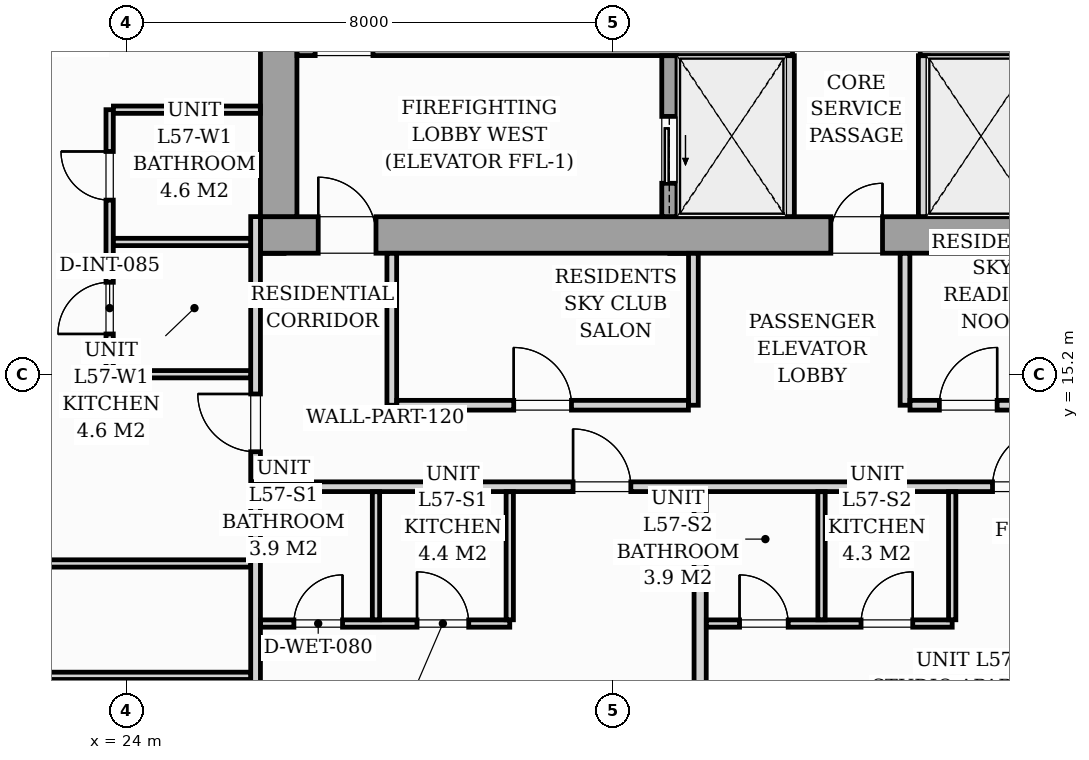
"""IFC4 building model, lengths in metres.
Left out: names, types, materials, properties, quantities, classifications, styles, units other than length and angle.
Written with IfcOpenShell. Run it as: python <this file> out.ifc"""

import sys

from ifc_helpers import new_model, si_unit, direction, frame, frame_2d, origin, origin_2d, place, context, subcontext, project, spatial, rectangle, i_section, extrude, source, transform, mapped, element, fill, save


model = new_model("IFC4")
c1 = context("Model", 3, precision=1e-05, world=origin(), true_north=direction((0.0, 1.0)))
c2 = subcontext(c1, "Body", "Model", "MODEL_VIEW")
j1 = project(units=[si_unit("LENGTHUNIT", "METRE"), si_unit("PLANEANGLEUNIT", "RADIAN")], contexts=[c1])
p1 = place(None, origin())
s1 = spatial("IfcSite", under=j1, at=p1, CompositionType="ELEMENT")
p2 = place(p1, origin())
s2 = spatial("IfcBuilding", under=s1, at=p2, CompositionType="ELEMENT")
p3 = place(p2, frame((0.0, 0.0, 198.6)))
s3 = spatial("IfcBuildingStorey", under=s2, at=p3, CompositionType="ELEMENT", Elevation=198.6)
m1 = source(origin(), c2, "Body", "SweptSolid", [
    extrude(i_section(OverallWidth=0.416, OverallDepth=0.446, WebThickness=0.039, FlangeThickness=0.063, FilletRadius=0.018, at=origin_2d()), origin(), (0.0, 0.0, 1.0), 3.196),
])
for number, where, z_axis, x_axis in (
    (1, (26.4, 17.4, 0.002), (0.0, 0.0, 1.0), (1.0, 0.0, 0.0)),
    (2, (33.12, 17.4, 0.002), (0.0, 0.0, 1.0), (1.0, 0.0, 0.0)),
):
    element("IfcColumn", number, at=place(p3, frame(where, z_axis=z_axis, x_axis=x_axis)), inside=s3, PredefinedType="PILASTER", context=c2, shape_type="MappedRepresentation", body=[
        mapped(m1, transform((0.0, 0.0, 0.0), scale=1.0)),
    ])
p4 = place(p3, frame((26.2, 17.5, 0.0), z_axis=(0.0, 0.0, 1.0), x_axis=(1.0, 0.0, 0.0)))
e3 = element("IfcWall", 3, at=p4, inside=s3, PredefinedType="SHEAR", context=c2, shape_type="SweptSolid", body=[
    extrude(rectangle(XDim=19.6, YDim=0.6, at=frame_2d((9.8, 0.0))), origin(), (0.0, 0.0, 1.0), 3.2),
])
p5 = place(p4, frame((0.95, 0.0, 0.0)))
e4 = element("IfcOpeningElement", 4, at=p5, cuts=e3, PredefinedType="OPENING", context=c2, shape_type="SweptSolid", body=[
    extrude(rectangle(XDim=0.95, YDim=2.06, at=frame_2d((0.475, 1.03))), frame((0.0, 0.31, 0.0), z_axis=(0.0, -1.0, 0.0), x_axis=(1.0, 0.0, 0.0)), (0.0, 0.0, 1.0), 0.62),
])
p6 = place(p4, frame((9.38, 0.0, 0.0)))
e5 = element("IfcOpeningElement", 5, at=p6, cuts=e3, PredefinedType="OPENING", context=c2, shape_type="SweptSolid", body=[
    extrude(rectangle(XDim=0.85, YDim=2.0, at=frame_2d((0.425, 1.0))), frame((0.0, 0.31, 0.0), z_axis=(0.0, -1.0, 0.0), x_axis=(1.0, 0.0, 0.0)), (0.0, 0.0, 1.0), 0.62),
])
p7 = place(p4, frame((17.55, 0.0, 0.0)))
e6 = element("IfcOpeningElement", 6, at=p7, cuts=e3, PredefinedType="OPENING", context=c2, shape_type="SweptSolid", body=[
    extrude(rectangle(XDim=0.95, YDim=2.06, at=frame_2d((0.475, 1.03))), frame((0.0, 0.31, 0.0), z_axis=(0.0, -1.0, 0.0), x_axis=(1.0, 0.0, 0.0)), (0.0, 0.0, 1.0), 0.62),
])
p8 = place(p3, frame((26.5, 17.802, 0.0), z_axis=(0.0, 0.0, 1.0), x_axis=(0.0, 1.0, 0.0)))
e7 = element("IfcWall", 7, at=p8, inside=s3, PredefinedType="SHEAR", context=c2, shape_type="SweptSolid", body=[
    extrude(rectangle(XDim=5.796, YDim=0.6, at=frame_2d((2.898, 0.0))), origin(), (0.0, 0.0, 1.0), 3.2),
])
p9 = place(p3, frame((26.802, 20.575, 0.0), z_axis=(0.0, 0.0, 1.0), x_axis=(1.0, 0.0, 0.0)))
e8 = element("IfcWall", 8, at=p9, inside=s3, PredefinedType="SOLIDWALL", context=c2, shape_type="SweptSolid", body=[
    extrude(rectangle(XDim=8.148, YDim=0.25, at=frame_2d((4.074, 0.0))), origin(), (0.0, 0.0, 1.0), 3.2),
])
p10 = place(p9, frame((0.298, 0.0, 0.0)))
e9 = element("IfcOpeningElement", 9, at=p10, cuts=e8, PredefinedType="OPENING", context=c2, shape_type="SweptSolid", body=[
    extrude(rectangle(XDim=0.95, YDim=2.06, at=frame_2d((0.475, 1.03))), frame((0.0, 0.135, 0.0), z_axis=(0.0, -1.0, 0.0), x_axis=(1.0, 0.0, 0.0)), (0.0, 0.0, 1.0), 0.27),
])
p11 = place(p3, frame((37.05, 20.575, 0.0), z_axis=(0.0, 0.0, 1.0), x_axis=(1.0, 0.0, 0.0)))
e10 = element("IfcWall", 10, at=p11, inside=s3, PredefinedType="SOLIDWALL", context=c2, shape_type="SweptSolid", body=[
    extrude(rectangle(XDim=8.148, YDim=0.25, at=frame_2d((4.074, 0.0))), origin(), (0.0, 0.0, 1.0), 3.2),
])
p12 = place(p11, frame((6.6, 0.0, 0.0)))
e11 = element("IfcOpeningElement", 11, at=p12, cuts=e10, PredefinedType="OPENING", context=c2, shape_type="SweptSolid", body=[
    extrude(rectangle(XDim=0.95, YDim=2.06, at=frame_2d((0.475, 1.03))), frame((0.0, 0.135, 0.0), z_axis=(0.0, -1.0, 0.0), x_axis=(1.0, 0.0, 0.0)), (0.0, 0.0, 1.0), 0.27),
])
p13 = place(p3, frame((32.925, 17.802, 0.0), z_axis=(0.0, 0.0, 1.0), x_axis=(0.0, 1.0, 0.0)))
e12 = element("IfcWall", 12, at=p13, inside=s3, PredefinedType="SOLIDWALL", context=c2, shape_type="SweptSolid", body=[
    extrude(rectangle(XDim=2.646, YDim=0.25, at=frame_2d((1.323, 0.0))), origin(), (0.0, 0.0, 1.0), 3.2),
])
p14 = place(p13, frame((0.548, 0.0, 0.0)))
e13 = element("IfcOpeningElement", 13, at=p14, cuts=e12, PredefinedType="OPENING", context=c2, shape_type="SweptSolid", body=[
    extrude(rectangle(XDim=1.1, YDim=2.08, at=frame_2d((0.55, 1.04))), frame((0.0, 0.135, 0.0), z_axis=(0.0, -1.0, 0.0), x_axis=(1.0, 0.0, 0.0)), (0.0, 0.0, 1.0), 0.27),
])
for number, where, z_axis, x_axis in (
    (14, (34.9, 17.802, 0.0), (0.0, 0.0, 1.0), (0.0, 1.0, 0.0)),
    (15, (37.1, 17.802, 0.0), (0.0, 0.0, 1.0), (0.0, 1.0, 0.0)),
):
    element("IfcWall", number, at=place(p3, frame(where, z_axis=z_axis, x_axis=x_axis)), inside=s3, PredefinedType="PARTITIONING", context=c2, shape_type="SweptSolid", body=[
        extrude(rectangle(XDim=2.646, YDim=0.16, at=frame_2d((1.323, 0.0))), origin(), (0.0, 0.0, 1.0), 2.94),
    ])
p15 = place(p3, frame((26.12, 13.36, 0.0), z_axis=(0.0, 0.0, 1.0), x_axis=(1.0, 0.0, 0.0)))
e16 = element("IfcWall", 16, at=p15, inside=s3, PredefinedType="PARTITIONING", context=c2, shape_type="SweptSolid", body=[
    extrude(rectangle(XDim=19.76, YDim=0.16, at=frame_2d((9.88, 0.0))), origin(), (0.0, 0.0, 1.0), 2.94),
])
p16 = place(p15, frame((5.221, 0.0, 0.0)))
e17 = element("IfcOpeningElement", 17, at=p16, cuts=e16, PredefinedType="OPENING", context=c2, shape_type="SweptSolid", body=[
    extrude(rectangle(XDim=0.95, YDim=2.06, at=frame_2d((0.475, 1.03))), frame((0.0, 0.09, 0.0), z_axis=(0.0, -1.0, 0.0), x_axis=(1.0, 0.0, 0.0)), (0.0, 0.0, 1.0), 0.18),
])
p17 = place(p15, frame((12.119, 0.0, 0.0)))
e18 = element("IfcOpeningElement", 18, at=p17, cuts=e16, PredefinedType="OPENING", context=c2, shape_type="SweptSolid", body=[
    extrude(rectangle(XDim=0.95, YDim=2.06, at=frame_2d((0.475, 1.03))), frame((0.0, 0.09, 0.0), z_axis=(0.0, -1.0, 0.0), x_axis=(1.0, 0.0, 0.0)), (0.0, 0.0, 1.0), 0.18),
])
p18 = place(p15, frame((14.492, 0.0, 0.0)))
e19 = element("IfcOpeningElement", 19, at=p18, cuts=e16, PredefinedType="OPENING", context=c2, shape_type="SweptSolid", body=[
    extrude(rectangle(XDim=0.95, YDim=2.06, at=frame_2d((0.475, 1.03))), frame((0.0, 0.09, 0.0), z_axis=(0.0, -1.0, 0.0), x_axis=(1.0, 0.0, 0.0)), (0.0, 0.0, 1.0), 0.18),
])
p19 = place(p3, frame((26.12, 7.261, 0.0), z_axis=(0.0, 0.0, 1.0), x_axis=(0.0, 1.0, 0.0)))
e20 = element("IfcWall", 20, at=p19, inside=s3, PredefinedType="PARTITIONING", context=c2, shape_type="SweptSolid", body=[
    extrude(rectangle(XDim=6.017, YDim=0.16, at=frame_2d((3.008, 0.0))), origin(), (0.0, 0.0, 1.0), 2.94),
])
p20 = place(p3, frame((26.12, 13.442, 0.0), z_axis=(0.0, 0.0, 1.0), x_axis=(0.0, 1.0, 0.0)))
e21 = element("IfcWall", 21, at=p20, inside=s3, PredefinedType="PARTITIONING", context=c2, shape_type="SweptSolid", body=[
    extrude(rectangle(XDim=4.36, YDim=0.16, at=frame_2d((2.18, 0.0))), origin(), (0.0, 0.0, 1.0), 2.94),
])
p21 = place(p20, frame((0.493, 0.0, 0.0)))
e22 = element("IfcOpeningElement", 22, at=p21, cuts=e21, PredefinedType="OPENING", context=c2, shape_type="SweptSolid", body=[
    extrude(rectangle(XDim=0.95, YDim=2.06, at=frame_2d((0.475, 1.03))), frame((0.0, 0.09, 0.0), z_axis=(0.0, -1.0, 0.0), x_axis=(1.0, 0.0, 0.0)), (0.0, 0.0, 1.0), 0.18),
])
p22 = place(p3, frame((26.202, 11.11, 0.0), z_axis=(0.0, 0.0, 1.0), x_axis=(1.0, 0.0, 0.0)))
e23 = element("IfcWall", 23, at=p22, inside=s3, PredefinedType="PARTITIONING", context=c2, shape_type="SweptSolid", body=[
    extrude(rectangle(XDim=4.098, YDim=0.12, at=frame_2d((2.049, 0.0))), origin(), (0.0, 0.0, 1.0), 2.94),
])
p23 = place(p22, frame((0.548, 0.0, 0.0)))
e24 = element("IfcOpeningElement", 24, at=p23, cuts=e23, PredefinedType="OPENING", context=c2, shape_type="SweptSolid", body=[
    extrude(rectangle(XDim=0.8, YDim=2.02, at=frame_2d((0.4, 1.01))), frame((0.0, 0.07, 0.0), z_axis=(0.0, -1.0, 0.0), x_axis=(1.0, 0.0, 0.0)), (0.0, 0.0, 1.0), 0.14),
])
p24 = place(p22, frame((2.573, 0.0, 0.0)))
e25 = element("IfcOpeningElement", 25, at=p24, cuts=e23, PredefinedType="OPENING", context=c2, shape_type="SweptSolid", body=[
    extrude(rectangle(XDim=0.85, YDim=2.05, at=frame_2d((0.425, 1.025))), frame((0.0, 0.07, 0.0), z_axis=(0.0, -1.0, 0.0), x_axis=(1.0, 0.0, 0.0)), (0.0, 0.0, 1.0), 0.14),
])
for number, where, z_axis, x_axis in (
    (26, (30.3, 11.172, 0.0), (0.0, 0.0, 1.0), (0.0, 1.0, 0.0)),
    (27, (28.1, 11.172, 0.0), (0.0, 0.0, 1.0), (0.0, 1.0, 0.0)),
):
    element("IfcWall", number, at=place(p3, frame(where, z_axis=z_axis, x_axis=x_axis)), inside=s3, PredefinedType="PARTITIONING", context=c2, shape_type="SweptSolid", body=[
        extrude(rectangle(XDim=2.106, YDim=0.12, at=frame_2d((1.053, 0.0))), origin(), (0.0, 0.0, 1.0), 2.94),
    ])
p25 = place(p3, frame((33.431, 7.782, 0.0), z_axis=(0.0, 0.0, 1.0), x_axis=(0.0, 1.0, 0.0)))
e28 = element("IfcWall", 28, at=p25, inside=s3, PredefinedType="PARTITIONING", context=c2, shape_type="SweptSolid", body=[
    extrude(rectangle(XDim=5.496, YDim=0.2, at=frame_2d((2.748, 0.0))), origin(), (0.0, 0.0, 1.0), 2.94),
])
p26 = place(p3, frame((33.533, 11.11, 0.0), z_axis=(0.0, 0.0, 1.0), x_axis=(1.0, 0.0, 0.0)))
e29 = element("IfcWall", 29, at=p26, inside=s3, PredefinedType="PARTITIONING", context=c2, shape_type="SweptSolid", body=[
    extrude(rectangle(XDim=4.043, YDim=0.12, at=frame_2d((2.021, 0.0))), origin(), (0.0, 0.0, 1.0), 2.94),
])
p27 = place(p26, frame((0.546, 0.0, 0.0)))
e30 = element("IfcOpeningElement", 30, at=p27, cuts=e29, PredefinedType="OPENING", context=c2, shape_type="SweptSolid", body=[
    extrude(rectangle(XDim=0.8, YDim=2.02, at=frame_2d((0.4, 1.01))), frame((0.0, 0.07, 0.0), z_axis=(0.0, -1.0, 0.0), x_axis=(1.0, 0.0, 0.0)), (0.0, 0.0, 1.0), 0.14),
])
p28 = place(p26, frame((2.544, 0.0, 0.0)))
e31 = element("IfcOpeningElement", 31, at=p28, cuts=e29, PredefinedType="OPENING", context=c2, shape_type="SweptSolid", body=[
    extrude(rectangle(XDim=0.85, YDim=2.05, at=frame_2d((0.425, 1.025))), frame((0.0, 0.07, 0.0), z_axis=(0.0, -1.0, 0.0), x_axis=(1.0, 0.0, 0.0)), (0.0, 0.0, 1.0), 0.14),
])
for number, where, z_axis, x_axis in (
    (32, (37.576, 11.172, 0.0), (0.0, 0.0, 1.0), (0.0, 1.0, 0.0)),
    (33, (35.427, 11.172, 0.0), (0.0, 0.0, 1.0), (0.0, 1.0, 0.0)),
):
    element("IfcWall", number, at=place(p3, frame(where, z_axis=z_axis, x_axis=x_axis)), inside=s3, PredefinedType="PARTITIONING", context=c2, shape_type="SweptSolid", body=[
        extrude(rectangle(XDim=2.106, YDim=0.12, at=frame_2d((1.053, 0.0))), origin(), (0.0, 0.0, 1.0), 2.94),
    ])
p29 = place(p3, frame((23.72, 15.21, 0.0), z_axis=(0.0, 0.0, 1.0), x_axis=(0.0, 1.0, 0.0)))
e34 = element("IfcWall", 34, at=p29, inside=s3, PredefinedType="PARTITIONING", context=c2, shape_type="SweptSolid", body=[
    extrude(rectangle(XDim=4.35, YDim=0.12, at=frame_2d((2.175, 0.0))), origin(), (0.0, 0.0, 1.0), 2.94),
])
p30 = place(p29, frame((0.662, 0.0, 0.0)))
e35 = element("IfcOpeningElement", 35, at=p30, cuts=e34, PredefinedType="OPENING", context=c2, shape_type="SweptSolid", body=[
    extrude(rectangle(XDim=0.85, YDim=2.05, at=frame_2d((0.425, 1.025))), frame((0.0, 0.07, 0.0), z_axis=(0.0, -1.0, 0.0), x_axis=(1.0, 0.0, 0.0)), (0.0, 0.0, 1.0), 0.14),
])
p31 = place(p29, frame((2.863, 0.0, 0.0)))
e36 = element("IfcOpeningElement", 36, at=p31, cuts=e34, PredefinedType="OPENING", context=c2, shape_type="SweptSolid", body=[
    extrude(rectangle(XDim=0.8, YDim=2.02, at=frame_2d((0.4, 1.01))), frame((0.0, 0.07, 0.0), z_axis=(0.0, -1.0, 0.0), x_axis=(1.0, 0.0, 0.0)), (0.0, 0.0, 1.0), 0.14),
])
p32 = place(p3, frame((23.782, 17.385, 0.0), z_axis=(0.0, 0.0, 1.0), x_axis=(1.0, 0.0, 0.0)))
e37 = element("IfcWall", 37, at=p32, inside=s3, PredefinedType="PARTITIONING", context=c2, shape_type="SweptSolid", body=[
    extrude(rectangle(XDim=2.256, YDim=0.12, at=frame_2d((1.128, 0.0))), origin(), (0.0, 0.0, 1.0), 2.281),
])
p33 = place(p3, frame((23.782, 15.21, 0.0), z_axis=(0.0, 0.0, 1.0), x_axis=(1.0, 0.0, 0.0)))
e38 = element("IfcWall", 38, at=p33, inside=s3, PredefinedType="PARTITIONING", context=c2, shape_type="SweptSolid", body=[
    extrude(rectangle(XDim=2.256, YDim=0.12, at=frame_2d((1.128, 0.0))), origin(), (0.0, 0.0, 1.0), 2.94),
])
p34 = place(p3, frame((23.782, 19.56, 0.0), z_axis=(0.0, 0.0, 1.0), x_axis=(1.0, 0.0, 0.0)))
e39 = element("IfcWall", 39, at=p34, inside=s3, PredefinedType="PARTITIONING", context=c2, shape_type="SweptSolid", body=[
    extrude(rectangle(XDim=2.416, YDim=0.12, at=frame_2d((1.208, 0.0))), origin(), (0.0, 0.0, 1.0), 2.94),
])
p35 = place(p3, frame((14.361, 10.25, 0.0), z_axis=(0.0, 0.0, 1.0), x_axis=(1.0, 0.0, 0.0)))
e40 = element("IfcWall", 40, at=p35, inside=s3, PredefinedType="PARTITIONING", context=c2, shape_type="SweptSolid", body=[
    extrude(rectangle(XDim=11.677, YDim=0.12, at=frame_2d((5.839, 0.0))), origin(), (0.0, 0.0, 1.0), 2.94),
])
p36 = place(p35, frame((5.407, 0.0, 0.0)))
e41 = element("IfcOpeningElement", 41, at=p36, cuts=e40, PredefinedType="OPENING", context=c2, shape_type="SweptSolid", body=[
    extrude(rectangle(XDim=0.85, YDim=2.05, at=frame_2d((0.425, 1.025))), frame((0.0, 0.07, 0.0), z_axis=(0.0, -1.0, 0.0), x_axis=(1.0, 0.0, 0.0)), (0.0, 0.0, 1.0), 0.14),
])
p37 = place(p3, frame((14.183, 12.098, 0.0), z_axis=(0.0, 0.0, 1.0), x_axis=(1.0, 0.0, 0.0)))
e42 = element("IfcWall", 42, at=p37, inside=s3, PredefinedType="PARTITIONING", context=c2, shape_type="SweptSolid", body=[
    extrude(rectangle(XDim=11.855, YDim=0.12, at=frame_2d((5.928, 0.0))), origin(), (0.0, 0.0, 1.0), 2.94),
])
p38 = place(p37, frame((5.496, 0.0, 0.0)))
e43 = element("IfcOpeningElement", 43, at=p38, cuts=e42, PredefinedType="OPENING", context=c2, shape_type="SweptSolid", body=[
    extrude(rectangle(XDim=0.85, YDim=2.05, at=frame_2d((0.425, 1.025))), frame((0.0, 0.07, 0.0), z_axis=(0.0, -1.0, 0.0), x_axis=(1.0, 0.0, 0.0)), (0.0, 0.0, 1.0), 0.14),
])
for number, where, z_axis, x_axis in (
    (44, (28.36, 14.7, 0.0), (0.0, 0.0, 1.0), (0.0, 1.0, 0.0)),
    (45, (33.32, 14.7, 0.0), (0.0, 0.0, 1.0), (0.0, 1.0, 0.0)),
):
    element("IfcWall", number, at=place(p3, frame(where, z_axis=z_axis, x_axis=x_axis)), inside=s3, PredefinedType="PARTITIONING", context=c2, shape_type="SweptSolid", body=[
        extrude(rectangle(XDim=2.498, YDim=0.16, at=frame_2d((1.249, 0.0))), origin(), (0.0, 0.0, 1.0), 2.94),
    ])
p39 = place(p3, frame((28.442, 14.7, 0.0), z_axis=(0.0, 0.0, 1.0), x_axis=(1.0, 0.0, 0.0)))
e46 = element("IfcWall", 46, at=p39, inside=s3, PredefinedType="PARTITIONING", context=c2, shape_type="SweptSolid", body=[
    extrude(rectangle(XDim=4.796, YDim=0.16, at=frame_2d((2.398, 0.0))), origin(), (0.0, 0.0, 1.0), 2.94),
])
p40 = place(p39, frame((1.923, 0.0, 0.0)))
e47 = element("IfcOpeningElement", 47, at=p40, cuts=e46, PredefinedType="OPENING", context=c2, shape_type="SweptSolid", body=[
    extrude(rectangle(XDim=0.95, YDim=2.06, at=frame_2d((0.475, 1.03))), frame((0.0, 0.09, 0.0), z_axis=(0.0, -1.0, 0.0), x_axis=(1.0, 0.0, 0.0)), (0.0, 0.0, 1.0), 0.18),
])
p41 = place(p3, frame((36.8, 14.7, 0.0), z_axis=(0.0, 0.0, 1.0), x_axis=(0.0, 1.0, 0.0)))
e48 = element("IfcWall", 48, at=p41, inside=s3, PredefinedType="PARTITIONING", context=c2, shape_type="SweptSolid", body=[
    extrude(rectangle(XDim=2.498, YDim=0.16, at=frame_2d((1.249, 0.0))), origin(), (0.0, 0.0, 1.0), 2.94),
])
p42 = place(p3, frame((36.882, 14.7, 0.0), z_axis=(0.0, 0.0, 1.0), x_axis=(1.0, 0.0, 0.0)))
e49 = element("IfcWall", 49, at=p42, inside=s3, PredefinedType="PARTITIONING", context=c2, shape_type="SweptSolid", body=[
    extrude(rectangle(XDim=2.018, YDim=0.16, at=frame_2d((1.009, 0.0))), origin(), (0.0, 0.0, 1.0), 2.94),
])
p43 = place(p42, frame((0.483, 0.0, 0.0)))
e50 = element("IfcOpeningElement", 50, at=p43, cuts=e49, PredefinedType="OPENING", context=c2, shape_type="SweptSolid", body=[
    extrude(rectangle(XDim=0.95, YDim=2.06, at=frame_2d((0.475, 1.03))), frame((0.0, 0.09, 0.0), z_axis=(0.0, -1.0, 0.0), x_axis=(1.0, 0.0, 0.0)), (0.0, 0.0, 1.0), 0.18),
])
m2 = source(origin(), c2, "Body", "SweptSolid", [
    extrude(rectangle(XDim=0.95, YDim=2.06, at=frame_2d((0.475, 1.03))), frame((0.0, 0.025, 0.0), z_axis=(0.0, -1.0, 0.0), x_axis=(1.0, 0.0, 0.0)), (0.0, 0.0, 1.0), 0.05),
])
p44 = place(p5, origin())
e51 = element("IfcDoor", 51, at=p44, inside=s3, OperationType="SINGLE_SWING_LEFT", PredefinedType="DOOR", context=c2, shape_type="MappedRepresentation", body=[
    mapped(m2, transform((0.0, 0.0, 0.0), scale=1.0)),
])
fill(e4, e51)
m3 = source(origin(), c2, "Body", "SweptSolid", [
    extrude(rectangle(XDim=0.85, YDim=2.0, at=frame_2d((0.425, 1.0))), frame((0.0, 0.025, 0.0), z_axis=(0.0, -1.0, 0.0), x_axis=(1.0, 0.0, 0.0)), (0.0, 0.0, 1.0), 0.05),
])
p45 = place(p6, origin())
e52 = element("IfcDoor", 52, at=p45, inside=s3, OperationType="SINGLE_SWING_RIGHT", PredefinedType="DOOR", context=c2, shape_type="MappedRepresentation", body=[
    mapped(m3, transform((0.0, 0.0, 0.0), scale=1.0)),
])
fill(e5, e52)
m4 = source(origin(), c2, "Body", "SweptSolid", [
    extrude(rectangle(XDim=1.1, YDim=2.08, at=frame_2d((0.55, 1.04))), frame((0.0, 0.025, 0.0), z_axis=(0.0, -1.0, 0.0), x_axis=(1.0, 0.0, 0.0)), (0.0, 0.0, 1.0), 0.05),
])
p46 = place(p14, origin())
e53 = element("IfcDoor", 53, at=p46, inside=s3, OperationType="SLIDING_TO_LEFT", PredefinedType="DOOR", context=c2, shape_type="MappedRepresentation", body=[
    mapped(m4, transform((0.0, 0.0, 0.0), scale=1.0)),
])
fill(e13, e53)
m5 = source(origin(), c2, "Body", "SweptSolid", [
    extrude(rectangle(XDim=0.95, YDim=2.06, at=frame_2d((0.475, 1.03))), frame((0.0, 0.025, 0.0), z_axis=(0.0, -1.0, 0.0), x_axis=(1.0, 0.0, 0.0)), (0.0, 0.0, 1.0), 0.05),
])
p47 = place(p16, origin())
e54 = element("IfcDoor", 54, at=p47, inside=s3, OperationType="SINGLE_SWING_LEFT", PredefinedType="DOOR", context=c2, shape_type="MappedRepresentation", body=[
    mapped(m5, transform((0.0, 0.0, 0.0), scale=1.0)),
])
fill(e17, e54)
m6 = source(origin(), c2, "Body", "SweptSolid", [
    extrude(rectangle(XDim=0.8, YDim=2.02, at=frame_2d((0.4, 1.01))), frame((0.0, 0.025, 0.0), z_axis=(0.0, -1.0, 0.0), x_axis=(1.0, 0.0, 0.0)), (0.0, 0.0, 1.0), 0.05),
])
p48 = place(p23, origin())
e55 = element("IfcDoor", 55, at=p48, inside=s3, OperationType="SINGLE_SWING_RIGHT", PredefinedType="DOOR", context=c2, shape_type="MappedRepresentation", body=[
    mapped(m6, transform((0.0, 0.0, 0.0), scale=1.0)),
])
fill(e24, e55)
m7 = source(origin(), c2, "Body", "SweptSolid", [
    extrude(rectangle(XDim=0.85, YDim=2.05, at=frame_2d((0.425, 1.025))), frame((0.0, 0.025, 0.0), z_axis=(0.0, -1.0, 0.0), x_axis=(1.0, 0.0, 0.0)), (0.0, 0.0, 1.0), 0.05),
])
p49 = place(p24, origin())
e56 = element("IfcDoor", 56, at=p49, inside=s3, OperationType="SINGLE_SWING_LEFT", PredefinedType="DOOR", context=c2, shape_type="MappedRepresentation", body=[
    mapped(m7, transform((0.0, 0.0, 0.0), scale=1.0)),
])
fill(e25, e56)
p50 = place(p17, origin())
e57 = element("IfcDoor", 57, at=p50, inside=s3, OperationType="SINGLE_SWING_RIGHT", PredefinedType="DOOR", context=c2, shape_type="MappedRepresentation", body=[
    mapped(m5, transform((0.0, 0.0, 0.0), scale=1.0)),
])
fill(e18, e57)
p51 = place(p27, origin())
e58 = element("IfcDoor", 58, at=p51, inside=s3, OperationType="SINGLE_SWING_LEFT", PredefinedType="DOOR", context=c2, shape_type="MappedRepresentation", body=[
    mapped(m6, transform((0.0, 0.0, 0.0), scale=1.0)),
])
fill(e30, e58)
p52 = place(p28, origin())
e59 = element("IfcDoor", 59, at=p52, inside=s3, OperationType="SINGLE_SWING_RIGHT", PredefinedType="DOOR", context=c2, shape_type="MappedRepresentation", body=[
    mapped(m7, transform((0.0, 0.0, 0.0), scale=1.0)),
])
fill(e31, e59)
p53 = place(p21, origin())
e60 = element("IfcDoor", 60, at=p53, inside=s3, OperationType="SINGLE_SWING_RIGHT", PredefinedType="DOOR", context=c2, shape_type="MappedRepresentation", body=[
    mapped(m5, transform((0.0, 0.0, 0.0), scale=1.0)),
])
fill(e22, e60)
p54 = place(p30, origin())
e61 = element("IfcDoor", 61, at=p54, inside=s3, OperationType="SINGLE_SWING_LEFT", PredefinedType="DOOR", context=c2, shape_type="MappedRepresentation", body=[
    mapped(m7, transform((0.0, 0.0, 0.0), scale=1.0)),
])
fill(e35, e61)
p55 = place(p31, origin())
e62 = element("IfcDoor", 62, at=p55, inside=s3, OperationType="SINGLE_SWING_RIGHT", PredefinedType="DOOR", context=c2, shape_type="MappedRepresentation", body=[
    mapped(m6, transform((0.0, 0.0, 0.0), scale=1.0)),
])
fill(e36, e62)
p56 = place(p40, origin())
e63 = element("IfcDoor", 63, at=p56, inside=s3, OperationType="SINGLE_SWING_LEFT", PredefinedType="DOOR", context=c2, shape_type="MappedRepresentation", body=[
    mapped(m5, transform((0.0, 0.0, 0.0), scale=1.0)),
])
fill(e47, e63)
p57 = place(p43, origin())
e64 = element("IfcDoor", 64, at=p57, inside=s3, OperationType="SINGLE_SWING_RIGHT", PredefinedType="DOOR", context=c2, shape_type="MappedRepresentation", body=[
    mapped(m5, transform((0.0, 0.0, 0.0), scale=1.0)),
])
fill(e50, e64)
save(model, sys.argv[1])
